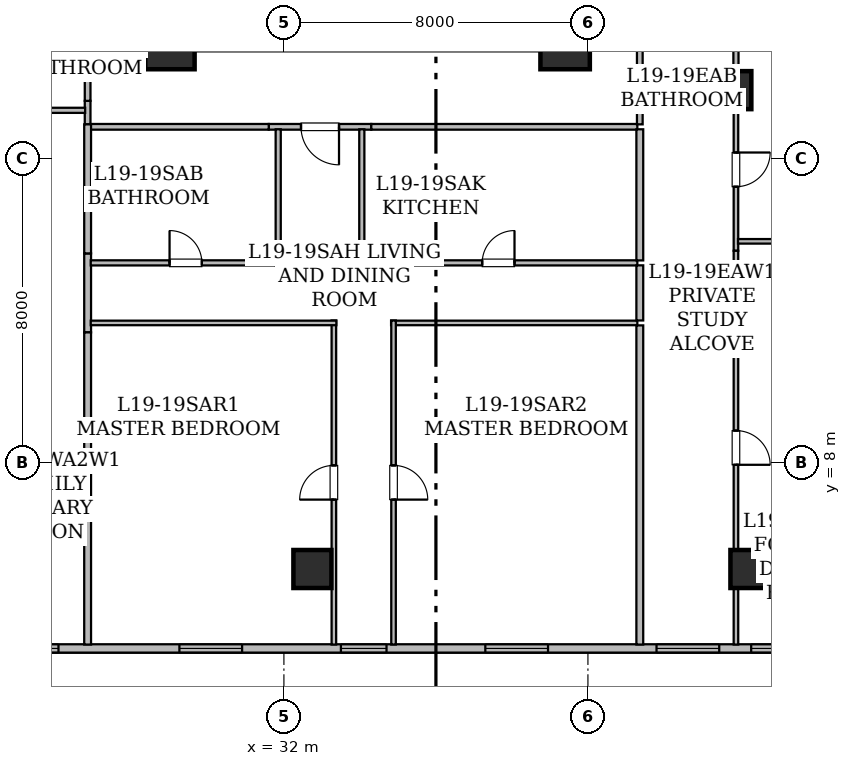
"""IFC4 building model, lengths in metres.
Left out: names, types, materials, properties, quantities, classifications, styles, units other than length and angle.
Written with IfcOpenShell. Run it as: python <this file> out.ifc"""

import sys

from ifc_helpers import new_model, si_unit, direction, frame, frame_2d, origin, origin_2d, place, context, subcontext, project, spatial, rectangle, hollow_rectangle, extrude, element, fill, save


model = new_model("IFC4")
c1 = context("Model", 3, precision=1e-05, world=origin(), true_north=direction((0.0, 1.0)))
c2 = subcontext(c1, "Body", "Model", "MODEL_VIEW")
j1 = project(units=[si_unit("LENGTHUNIT", "METRE"), si_unit("PLANEANGLEUNIT", "RADIAN")], contexts=[c1])
p1 = place(None, origin())
s1 = spatial("IfcSite", under=j1, at=p1, CompositionType="ELEMENT")
p2 = place(p1, origin())
s2 = spatial("IfcBuilding", under=s1, at=p2, CompositionType="ELEMENT")
p3 = place(p2, frame((0.0, 0.0, 77.1)))
s3 = spatial("IfcBuildingStorey", under=s2, at=p3, CompositionType="ELEMENT", Elevation=77.1)
for number, where, z_axis, x_axis in (
    (1, (29.0, 19.0, 0.0), (0.0, 0.0, 1.0), (1.0, 0.0, 0.0)),
    (2, (39.4, 19.0, 0.0), (0.0, 0.0, 1.0), (1.0, 0.0, 0.0)),
):
    element("IfcColumn", number, at=place(p3, frame(where, z_axis=z_axis, x_axis=x_axis)), inside=s3, PredefinedType="COLUMN", context=c2, shape_type="SweptSolid", body=[
        extrude(hollow_rectangle(XDim=1.3, YDim=1.3, WallThickness=0.065, at=origin_2d()), origin(), (0.0, 0.0, 1.0), 3.65),
    ])
for number, where, z_axis, x_axis in (
    (3, (32.75, 5.2, 0.0), (0.0, 0.0, 1.0), (1.0, 0.0, 0.0)),
    (4, (44.25, 5.2, 0.0), (0.0, 0.0, 1.0), (1.0, 0.0, 0.0)),
    (5, (43.8, 17.8, 0.0), (0.0, 0.0, 1.0), (1.0, 0.0, 0.0)),
):
    element("IfcColumn", number, at=place(p3, frame(where, z_axis=z_axis, x_axis=x_axis)), inside=s3, PredefinedType="COLUMN", context=c2, shape_type="SweptSolid", body=[
        extrude(hollow_rectangle(XDim=1.0, YDim=1.0, WallThickness=0.05, at=origin_2d()), origin(), (0.0, 0.0, 1.0), 3.65),
    ])
p4 = place(p3, frame((45.683, 3.11, 0.0), z_axis=(0.0, 0.0, 1.0), x_axis=(-1.0, 0.0, 0.0)))
e6 = element("IfcWall", 6, at=p4, inside=s3, PredefinedType="STANDARD", context=c2, shape_type="SweptSolid", body=[
    extrude(rectangle(XDim=37.368, YDim=0.22, at=frame_2d((18.684, 0.0))), origin(), (0.0, 0.0, 1.0), 3.43),
])
p5 = place(p4, frame((31.194, 0.0, 0.85)))
e7 = element("IfcOpeningElement", 7, at=p5, cuts=e6, PredefinedType="OPENING", context=c2, shape_type="SweptSolid", body=[
    extrude(rectangle(XDim=1.65, YDim=1.55, at=frame_2d((0.825, 0.775))), frame((0.0, 0.12, 0.0), z_axis=(0.0, -1.0, 0.0), x_axis=(1.0, 0.0, 0.0)), (0.0, 0.0, 1.0), 0.24),
])
p6 = place(p4, frame((19.615, 0.0, 0.85)))
e8 = element("IfcOpeningElement", 8, at=p6, cuts=e6, PredefinedType="OPENING", context=c2, shape_type="SweptSolid", body=[
    extrude(rectangle(XDim=1.65, YDim=1.55, at=frame_2d((0.825, 0.775))), frame((0.0, 0.12, 0.0), z_axis=(0.0, -1.0, 0.0), x_axis=(1.0, 0.0, 0.0)), (0.0, 0.0, 1.0), 0.24),
])
p7 = place(p4, frame((22.223, 0.0, 0.8)))
e9 = element("IfcOpeningElement", 9, at=p7, cuts=e6, PredefinedType="OPENING", context=c2, shape_type="SweptSolid", body=[
    extrude(rectangle(XDim=1.2, YDim=1.5, at=frame_2d((0.6, 0.75))), frame((0.0, 0.12, 0.0), z_axis=(0.0, -1.0, 0.0), x_axis=(1.0, 0.0, 0.0)), (0.0, 0.0, 1.0), 0.24),
])
p8 = place(p4, frame((25.65, 0.0, 0.85)))
e10 = element("IfcOpeningElement", 10, at=p8, cuts=e6, PredefinedType="OPENING", context=c2, shape_type="SweptSolid", body=[
    extrude(rectangle(XDim=1.65, YDim=1.55, at=frame_2d((0.825, 0.775))), frame((0.0, 0.12, 0.0), z_axis=(0.0, -1.0, 0.0), x_axis=(1.0, 0.0, 0.0)), (0.0, 0.0, 1.0), 0.24),
])
p9 = place(p4, frame((10.983, 0.0, 0.8)))
e11 = element("IfcOpeningElement", 11, at=p9, cuts=e6, PredefinedType="OPENING", context=c2, shape_type="SweptSolid", body=[
    extrude(rectangle(XDim=1.2, YDim=1.5, at=frame_2d((0.6, 0.75))), frame((0.0, 0.12, 0.0), z_axis=(0.0, -1.0, 0.0), x_axis=(1.0, 0.0, 0.0)), (0.0, 0.0, 1.0), 0.24),
])
p10 = place(p4, frame((14.783, 0.0, 0.85)))
e12 = element("IfcOpeningElement", 12, at=p10, cuts=e6, PredefinedType="OPENING", context=c2, shape_type="SweptSolid", body=[
    extrude(rectangle(XDim=1.65, YDim=1.55, at=frame_2d((0.825, 0.775))), frame((0.0, 0.12, 0.0), z_axis=(0.0, -1.0, 0.0), x_axis=(1.0, 0.0, 0.0)), (0.0, 0.0, 1.0), 0.24),
])
p11 = place(p4, frame((6.733, 0.0, 0.85)))
e13 = element("IfcOpeningElement", 13, at=p11, cuts=e6, PredefinedType="OPENING", context=c2, shape_type="SweptSolid", body=[
    extrude(rectangle(XDim=1.65, YDim=1.55, at=frame_2d((0.825, 0.775))), frame((0.0, 0.12, 0.0), z_axis=(0.0, -1.0, 0.0), x_axis=(1.0, 0.0, 0.0)), (0.0, 0.0, 1.0), 0.24),
])
p12 = place(p4, frame((2.228, 0.0, 0.85)))
e14 = element("IfcOpeningElement", 14, at=p12, cuts=e6, PredefinedType="OPENING", context=c2, shape_type="SweptSolid", body=[
    extrude(rectangle(XDim=1.65, YDim=1.55, at=frame_2d((0.825, 0.775))), frame((0.0, 0.12, 0.0), z_axis=(0.0, -1.0, 0.0), x_axis=(1.0, 0.0, 0.0)), (0.0, 0.0, 1.0), 0.24),
])
p13 = place(p4, frame((0.187, 0.0, 0.8)))
e15 = element("IfcOpeningElement", 15, at=p13, cuts=e6, PredefinedType="OPENING", context=c2, shape_type="SweptSolid", body=[
    extrude(rectangle(XDim=1.2, YDim=1.5, at=frame_2d((0.6, 0.75))), frame((0.0, 0.12, 0.0), z_axis=(0.0, -1.0, 0.0), x_axis=(1.0, 0.0, 0.0)), (0.0, 0.0, 1.0), 0.24),
])
p14 = place(p3, frame((26.835, 16.9, 0.0), z_axis=(0.0, 0.0, 1.0), x_axis=(0.0, 1.0, 0.0)))
e16 = element("IfcWall", 16, at=p14, inside=s3, PredefinedType="STANDARD", context=c2, shape_type="SweptSolid", body=[
    extrude(rectangle(XDim=0.618, YDim=0.15, at=frame_2d((0.309, 0.0))), origin(), (0.0, 0.0, 1.0), 3.43),
])
p15 = place(p3, frame((26.835, 17.518, 0.0), z_axis=(0.0, 0.0, 1.0), x_axis=(0.0, 1.0, 0.0)))
e17 = element("IfcWall", 17, at=p15, inside=s3, PredefinedType="STANDARD", context=c2, shape_type="SweptSolid", body=[
    extrude(rectangle(XDim=3.467, YDim=0.15, at=frame_2d((1.733, 0.0))), origin(), (0.0, 0.0, 1.0), 2.647),
])
p16 = place(p3, frame((34.299, 16.835, 0.0), z_axis=(0.0, 0.0, 1.0), x_axis=(-1.0, 0.0, 0.0)))
e18 = element("IfcWall", 18, at=p16, inside=s3, PredefinedType="STANDARD", context=c2, shape_type="SweptSolid", body=[
    extrude(rectangle(XDim=2.698, YDim=0.15, at=frame_2d((1.349, 0.0))), origin(), (0.0, 0.0, 1.0), 3.43),
])
p17 = place(p16, frame((0.849, 0.0, 0.0)))
e19 = element("IfcOpeningElement", 19, at=p17, cuts=e18, PredefinedType="OPENING", context=c2, shape_type="SweptSolid", body=[
    extrude(rectangle(XDim=1.0, YDim=2.15, at=frame_2d((0.5, 1.075))), frame((0.0, 0.085, 0.0), z_axis=(0.0, -1.0, 0.0), x_axis=(1.0, 0.0, 0.0)), (0.0, 0.0, 1.0), 0.17),
])
p18 = place(p3, frame((31.601, 16.835, 0.0), z_axis=(0.0, 0.0, 1.0), x_axis=(-1.0, 0.0, 0.0)))
e20 = element("IfcWall", 20, at=p18, inside=s3, PredefinedType="STANDARD", context=c2, shape_type="SweptSolid", body=[
    extrude(rectangle(XDim=4.701, YDim=0.15, at=frame_2d((2.351, 0.0))), origin(), (0.0, 0.0, 1.0), 2.647),
])
p19 = place(p3, frame((41.3, 16.835, 0.0), z_axis=(0.0, 0.0, 1.0), x_axis=(-1.0, 0.0, 0.0)))
e21 = element("IfcWall", 21, at=p19, inside=s3, PredefinedType="STANDARD", context=c2, shape_type="SweptSolid", body=[
    extrude(rectangle(XDim=7.001, YDim=0.15, at=frame_2d((3.5, 0.0))), origin(), (0.0, 0.0, 1.0), 3.43),
])
p20 = place(p3, frame((41.365, 18.118, 0.0), z_axis=(0.0, 0.0, 1.0), x_axis=(0.0, -1.0, 0.0)))
e22 = element("IfcWall", 22, at=p20, inside=s3, PredefinedType="STANDARD", context=c2, shape_type="SweptSolid", body=[
    extrude(rectangle(XDim=1.218, YDim=0.15, at=frame_2d((0.609, 0.0))), origin(), (0.0, 0.0, 1.0), 3.43),
])
p21 = place(p3, frame((41.365, 21.585, 0.0), z_axis=(0.0, 0.0, 1.0), x_axis=(0.0, -1.0, 0.0)))
e23 = element("IfcWall", 23, at=p21, inside=s3, PredefinedType="STANDARD", context=c2, shape_type="SweptSolid", body=[
    extrude(rectangle(XDim=3.467, YDim=0.15, at=frame_2d((1.733, 0.0))), origin(), (0.0, 0.0, 1.0), 2.647),
])
p22 = place(p3, frame((23.715, 17.269, 0.0), z_axis=(0.0, 0.0, 1.0), x_axis=(1.0, 0.0, 0.0)))
e24 = element("IfcWall", 24, at=p22, inside=s3, PredefinedType="PARTITIONING", context=c2, shape_type="SweptSolid", body=[
    extrude(rectangle(XDim=3.055, YDim=0.135, at=frame_2d((1.527, 0.0))), origin(), (0.0, 0.0, 1.0), 3.43),
])
p23 = place(p3, frame((26.835, 13.504, 0.0), z_axis=(0.0, 0.0, 1.0), x_axis=(0.0, -1.0, 0.0)))
e25 = element("IfcWall", 25, at=p23, inside=s3, PredefinedType="STANDARD", context=c2, shape_type="SweptSolid", body=[
    extrude(rectangle(XDim=2.078, YDim=0.18, at=frame_2d((1.039, 0.0))), origin(), (0.0, 0.0, 1.0), 3.43),
])
p24 = place(p3, frame((26.835, 16.9, 0.0), z_axis=(0.0, 0.0, 1.0), x_axis=(0.0, -1.0, 0.0)))
e26 = element("IfcWall", 26, at=p24, inside=s3, PredefinedType="STANDARD", context=c2, shape_type="SweptSolid", body=[
    extrude(rectangle(XDim=3.396, YDim=0.18, at=frame_2d((1.698, 0.0))), origin(), (0.0, 0.0, 1.0), 3.43),
])
p25 = place(p3, frame((26.835, 11.426, 0.0), z_axis=(0.0, 0.0, 1.0), x_axis=(0.0, -1.0, 0.0)))
e27 = element("IfcWall", 27, at=p25, inside=s3, PredefinedType="STANDARD", context=c2, shape_type="SweptSolid", body=[
    extrude(rectangle(XDim=8.214, YDim=0.18, at=frame_2d((4.107, 0.0))), origin(), (0.0, 0.0, 1.0), 2.803),
])
p26 = place(p3, frame((26.917, 13.255, 0.0), z_axis=(0.0, 0.0, 1.0), x_axis=(1.0, 0.0, 0.0)))
e28 = element("IfcWall", 28, at=p26, inside=s3, PredefinedType="PARTITIONING", context=c2, shape_type="SweptSolid", body=[
    extrude(rectangle(XDim=4.998, YDim=0.135, at=frame_2d((2.499, 0.0))), origin(), (0.0, 0.0, 1.0), 2.647),
])
p27 = place(p26, frame((2.074, 0.0, 0.0)))
e29 = element("IfcOpeningElement", 29, at=p27, cuts=e28, PredefinedType="OPENING", context=c2, shape_type="SweptSolid", body=[
    extrude(rectangle(XDim=0.85, YDim=2.1, at=frame_2d((0.425, 1.05))), frame((0.0, 0.077, 0.0), z_axis=(0.0, -1.0, 0.0), x_axis=(1.0, 0.0, 0.0)), (0.0, 0.0, 1.0), 0.155),
])
for number, where, z_axis, x_axis in (
    (30, (31.85, 13.19, 0.0), (0.0, 0.0, 1.0), (0.0, 1.0, 0.0)),
    (31, (34.05, 16.77, 0.0), (0.0, 0.0, 1.0), (0.0, -1.0, 0.0)),
):
    element("IfcWall", number, at=place(p3, frame(where, z_axis=z_axis, x_axis=x_axis)), inside=s3, PredefinedType="PARTITIONING", context=c2, shape_type="SweptSolid", body=[
        extrude(rectangle(XDim=3.58, YDim=0.135, at=frame_2d((1.79, 0.0))), origin(), (0.0, 0.0, 1.0), 3.43),
    ])
p28 = place(p3, frame((33.985, 13.255, 0.0), z_axis=(0.0, 0.0, 1.0), x_axis=(1.0, 0.0, 0.0)))
e32 = element("IfcWall", 32, at=p28, inside=s3, PredefinedType="PARTITIONING", context=c2, shape_type="SweptSolid", body=[
    extrude(rectangle(XDim=7.315, YDim=0.135, at=frame_2d((3.657, 0.0))), origin(), (0.0, 0.0, 1.0), 3.43),
])
p29 = place(p28, frame((3.233, 0.0, 0.0)))
e33 = element("IfcOpeningElement", 33, at=p29, cuts=e32, PredefinedType="OPENING", context=c2, shape_type="SweptSolid", body=[
    extrude(rectangle(XDim=0.85, YDim=2.1, at=frame_2d((0.425, 1.05))), frame((0.0, 0.077, 0.0), z_axis=(0.0, -1.0, 0.0), x_axis=(1.0, 0.0, 0.0)), (0.0, 0.0, 1.0), 0.155),
])
p30 = place(p3, frame((33.315, 3.212, 0.0), z_axis=(0.0, 0.0, 1.0), x_axis=(0.0, 1.0, 0.0)))
e34 = element("IfcWall", 34, at=p30, inside=s3, PredefinedType="PARTITIONING", context=c2, shape_type="SweptSolid", body=[
    extrude(rectangle(XDim=8.528, YDim=0.12, at=frame_2d((4.264, 0.0))), origin(), (0.0, 0.0, 1.0), 2.803),
])
p31 = place(p30, frame((3.814, 0.0, 0.0)))
e35 = element("IfcOpeningElement", 35, at=p31, cuts=e34, PredefinedType="OPENING", context=c2, shape_type="SweptSolid", body=[
    extrude(rectangle(XDim=0.9, YDim=2.1, at=frame_2d((0.45, 1.05))), frame((0.0, 0.07, 0.0), z_axis=(0.0, -1.0, 0.0), x_axis=(1.0, 0.0, 0.0)), (0.0, 0.0, 1.0), 0.14),
])
p32 = place(p3, frame((33.38, 11.675, 0.0), z_axis=(0.0, 0.0, 1.0), x_axis=(-1.0, 0.0, 0.0)))
e36 = element("IfcWall", 36, at=p32, inside=s3, PredefinedType="PARTITIONING", context=c2, shape_type="SweptSolid", body=[
    extrude(rectangle(XDim=6.463, YDim=0.12, at=frame_2d((3.231, 0.0))), origin(), (0.0, 0.0, 1.0), 2.647),
])
p33 = place(p3, frame((41.3, 11.675, 0.0), z_axis=(0.0, 0.0, 1.0), x_axis=(-1.0, 0.0, 0.0)))
e37 = element("IfcWall", 37, at=p33, inside=s3, PredefinedType="PARTITIONING", context=c2, shape_type="SweptSolid", body=[
    extrude(rectangle(XDim=6.48, YDim=0.12, at=frame_2d((3.24, 0.0))), origin(), (0.0, 0.0, 1.0), 3.43),
])
p34 = place(p3, frame((34.885, 11.74, 0.0), z_axis=(0.0, 0.0, 1.0), x_axis=(0.0, -1.0, 0.0)))
e38 = element("IfcWall", 38, at=p34, inside=s3, PredefinedType="PARTITIONING", context=c2, shape_type="SweptSolid", body=[
    extrude(rectangle(XDim=8.528, YDim=0.12, at=frame_2d((4.264, 0.0))), origin(), (0.0, 0.0, 1.0), 2.803),
])
p35 = place(p34, frame((3.814, 0.0, 0.0)))
e39 = element("IfcOpeningElement", 39, at=p35, cuts=e38, PredefinedType="OPENING", context=c2, shape_type="SweptSolid", body=[
    extrude(rectangle(XDim=0.9, YDim=2.1, at=frame_2d((0.45, 1.05))), frame((0.0, 0.07, 0.0), z_axis=(0.0, -1.0, 0.0), x_axis=(1.0, 0.0, 0.0)), (0.0, 0.0, 1.0), 0.14),
])
p36 = place(p3, frame((41.365, 13.19, 0.0), z_axis=(0.0, 0.0, 1.0), x_axis=(0.0, -1.0, 0.0)))
e40 = element("IfcWall", 40, at=p36, inside=s3, PredefinedType="STANDARD", context=c2, shape_type="SweptSolid", body=[
    extrude(rectangle(XDim=1.45, YDim=0.18, at=frame_2d((0.725, 0.0))), origin(), (0.0, 0.0, 1.0), 3.43),
])
p37 = place(p3, frame((41.365, 16.77, 0.0), z_axis=(0.0, 0.0, 1.0), x_axis=(0.0, -1.0, 0.0)))
e41 = element("IfcWall", 41, at=p37, inside=s3, PredefinedType="STANDARD", context=c2, shape_type="SweptSolid", body=[
    extrude(rectangle(XDim=3.45, YDim=0.18, at=frame_2d((1.725, 0.0))), origin(), (0.0, 0.0, 1.0), 3.43),
])
p38 = place(p3, frame((41.365, 11.61, 0.0), z_axis=(0.0, 0.0, 1.0), x_axis=(0.0, -1.0, 0.0)))
e42 = element("IfcWall", 42, at=p38, inside=s3, PredefinedType="STANDARD", context=c2, shape_type="SweptSolid", body=[
    extrude(rectangle(XDim=8.398, YDim=0.18, at=frame_2d((4.199, 0.0))), origin(), (0.0, 0.0, 1.0), 2.803),
])
p39 = place(p3, frame((43.895, 17.804, 0.0), z_axis=(0.0, 0.0, 1.0), x_axis=(0.0, -1.0, 0.0)))
e43 = element("IfcWall", 43, at=p39, inside=s3, PredefinedType="PARTITIONING", context=c2, shape_type="SweptSolid", body=[
    extrude(rectangle(XDim=4.231, YDim=0.12, at=frame_2d((2.115, 0.0))), origin(), (0.0, 0.0, 1.0), 2.647),
])
p40 = place(p39, frame((1.645, 0.0, 0.0)))
e44 = element("IfcOpeningElement", 44, at=p40, cuts=e43, PredefinedType="OPENING", context=c2, shape_type="SweptSolid", body=[
    extrude(rectangle(XDim=0.9, YDim=2.1, at=frame_2d((0.45, 1.05))), frame((0.0, 0.07, 0.0), z_axis=(0.0, -1.0, 0.0), x_axis=(1.0, 0.0, 0.0)), (0.0, 0.0, 1.0), 0.14),
])
p41 = place(p3, frame((43.895, 13.573, 0.0), z_axis=(0.0, 0.0, 1.0), x_axis=(0.0, -1.0, 0.0)))
e45 = element("IfcWall", 45, at=p41, inside=s3, PredefinedType="PARTITIONING", context=c2, shape_type="SweptSolid", body=[
    extrude(rectangle(XDim=10.361, YDim=0.12, at=frame_2d((5.181, 0.0))), origin(), (0.0, 0.0, 1.0), 2.647),
])
p42 = place(p41, frame((4.731, 0.0, 0.0)))
e46 = element("IfcOpeningElement", 46, at=p42, cuts=e45, PredefinedType="OPENING", context=c2, shape_type="SweptSolid", body=[
    extrude(rectangle(XDim=0.9, YDim=2.1, at=frame_2d((0.45, 1.05))), frame((0.0, 0.07, 0.0), z_axis=(0.0, -1.0, 0.0), x_axis=(1.0, 0.0, 0.0)), (0.0, 0.0, 1.0), 0.14),
])
p43 = place(p3, frame((41.432, 17.869, 0.0), z_axis=(0.0, 0.0, 1.0), x_axis=(1.0, 0.0, 0.0)))
e47 = element("IfcWall", 47, at=p43, inside=s3, PredefinedType="PARTITIONING", context=c2, shape_type="SweptSolid", body=[
    extrude(rectangle(XDim=2.398, YDim=0.135, at=frame_2d((1.199, 0.0))), origin(), (0.0, 0.0, 1.0), 2.647),
])
p44 = place(p3, frame((47.31, 13.822, 0.0), z_axis=(0.0, 0.0, 1.0), x_axis=(-1.0, 0.0, 0.0)))
e48 = element("IfcWall", 48, at=p44, inside=s3, PredefinedType="PARTITIONING", context=c2, shape_type="SweptSolid", body=[
    extrude(rectangle(XDim=3.361, YDim=0.12, at=frame_2d((1.681, 0.0))), origin(), (0.0, 0.0, 1.0), 2.647),
])
p45 = place(p44, frame((1.231, 0.0, 0.0)))
e49 = element("IfcOpeningElement", 49, at=p45, cuts=e48, PredefinedType="OPENING", context=c2, shape_type="SweptSolid", body=[
    extrude(rectangle(XDim=0.9, YDim=2.1, at=frame_2d((0.45, 1.05))), frame((0.0, 0.07, 0.0), z_axis=(0.0, -1.0, 0.0), x_axis=(1.0, 0.0, 0.0)), (0.0, 0.0, 1.0), 0.14),
])
p46 = place(p3, frame((43.895, 17.804, 0.0), z_axis=(0.0, 0.0, 1.0), x_axis=(0.0, 1.0, 0.0)))
e50 = element("IfcWall", 50, at=p46, inside=s3, PredefinedType="PARTITIONING", context=c2, shape_type="SweptSolid", body=[
    extrude(rectangle(XDim=4.095, YDim=0.135, at=frame_2d((2.047, 0.0))), origin(), (0.0, 0.0, 1.0), 2.647),
])
p47 = place(p46, frame((1.622, 0.0, 0.0)))
e51 = element("IfcOpeningElement", 51, at=p47, cuts=e50, PredefinedType="OPENING", context=c2, shape_type="SweptSolid", body=[
    extrude(rectangle(XDim=0.85, YDim=2.1, at=frame_2d((0.425, 1.05))), frame((0.0, 0.077, 0.0), z_axis=(0.0, -1.0, 0.0), x_axis=(1.0, 0.0, 0.0)), (0.0, 0.0, 1.0), 0.155),
])
p48 = place(p6, origin())
e52 = element("IfcWindow", 52, at=p48, inside=s3, PartitioningType="SINGLE_PANEL", PredefinedType="WINDOW", context=c2, shape_type="SweptSolid", body=[
    extrude(rectangle(XDim=1.65, YDim=1.55, at=frame_2d((0.825, 0.775))), frame((0.0, 0.03, 0.0), z_axis=(0.0, -1.0, 0.0), x_axis=(1.0, 0.0, 0.0)), (0.0, 0.0, 1.0), 0.06),
])
fill(e8, e52)
p49 = place(p9, origin())
e53 = element("IfcWindow", 53, at=p49, inside=s3, PartitioningType="SINGLE_PANEL", PredefinedType="WINDOW", context=c2, shape_type="SweptSolid", body=[
    extrude(rectangle(XDim=1.2, YDim=1.5, at=frame_2d((0.6, 0.75))), frame((0.0, 0.03, 0.0), z_axis=(0.0, -1.0, 0.0), x_axis=(1.0, 0.0, 0.0)), (0.0, 0.0, 1.0), 0.06),
])
fill(e11, e53)
p50 = place(p10, origin())
e54 = element("IfcWindow", 54, at=p50, inside=s3, PartitioningType="SINGLE_PANEL", PredefinedType="WINDOW", context=c2, shape_type="SweptSolid", body=[
    extrude(rectangle(XDim=1.65, YDim=1.55, at=frame_2d((0.825, 0.775))), frame((0.0, 0.03, 0.0), z_axis=(0.0, -1.0, 0.0), x_axis=(1.0, 0.0, 0.0)), (0.0, 0.0, 1.0), 0.06),
])
fill(e12, e54)
p51 = place(p11, origin())
e55 = element("IfcWindow", 55, at=p51, inside=s3, PartitioningType="SINGLE_PANEL", PredefinedType="WINDOW", context=c2, shape_type="SweptSolid", body=[
    extrude(rectangle(XDim=1.65, YDim=1.55, at=frame_2d((0.825, 0.775))), frame((0.0, 0.03, 0.0), z_axis=(0.0, -1.0, 0.0), x_axis=(1.0, 0.0, 0.0)), (0.0, 0.0, 1.0), 0.06),
])
fill(e13, e55)
p52 = place(p12, origin())
e56 = element("IfcWindow", 56, at=p52, inside=s3, PartitioningType="SINGLE_PANEL", PredefinedType="WINDOW", context=c2, shape_type="SweptSolid", body=[
    extrude(rectangle(XDim=1.65, YDim=1.55, at=frame_2d((0.825, 0.775))), frame((0.0, 0.03, 0.0), z_axis=(0.0, -1.0, 0.0), x_axis=(1.0, 0.0, 0.0)), (0.0, 0.0, 1.0), 0.06),
])
fill(e14, e56)
p53 = place(p13, origin())
e57 = element("IfcWindow", 57, at=p53, inside=s3, PartitioningType="SINGLE_PANEL", PredefinedType="WINDOW", context=c2, shape_type="SweptSolid", body=[
    extrude(rectangle(XDim=1.2, YDim=1.5, at=frame_2d((0.6, 0.75))), frame((0.0, 0.03, 0.0), z_axis=(0.0, -1.0, 0.0), x_axis=(1.0, 0.0, 0.0)), (0.0, 0.0, 1.0), 0.06),
])
fill(e15, e57)
p54 = place(p17, origin())
e58 = element("IfcDoor", 58, at=p54, inside=s3, OperationType="SINGLE_SWING_LEFT", PredefinedType="DOOR", context=c2, shape_type="SweptSolid", body=[
    extrude(rectangle(XDim=1.0, YDim=2.15, at=frame_2d((0.5, 1.075))), frame((0.0, 0.025, 0.0), z_axis=(0.0, -1.0, 0.0), x_axis=(1.0, 0.0, 0.0)), (0.0, 0.0, 1.0), 0.05),
])
fill(e19, e58)
p55 = place(p27, origin())
e59 = element("IfcDoor", 59, at=p55, inside=s3, OperationType="SINGLE_SWING_LEFT", PredefinedType="DOOR", context=c2, shape_type="SweptSolid", body=[
    extrude(rectangle(XDim=0.85, YDim=2.1, at=frame_2d((0.425, 1.05))), frame((0.0, 0.025, 0.0), z_axis=(0.0, -1.0, 0.0), x_axis=(1.0, 0.0, 0.0)), (0.0, 0.0, 1.0), 0.05),
])
fill(e29, e59)
p56 = place(p29, origin())
e60 = element("IfcDoor", 60, at=p56, inside=s3, OperationType="SINGLE_SWING_RIGHT", PredefinedType="DOOR", context=c2, shape_type="SweptSolid", body=[
    extrude(rectangle(XDim=0.85, YDim=2.1, at=frame_2d((0.425, 1.05))), frame((0.0, 0.025, 0.0), z_axis=(0.0, -1.0, 0.0), x_axis=(1.0, 0.0, 0.0)), (0.0, 0.0, 1.0), 0.05),
])
fill(e33, e60)
p57 = place(p31, origin())
e61 = element("IfcDoor", 61, at=p57, inside=s3, OperationType="SINGLE_SWING_LEFT", PredefinedType="DOOR", context=c2, shape_type="SweptSolid", body=[
    extrude(rectangle(XDim=0.9, YDim=2.1, at=frame_2d((0.45, 1.05))), frame((0.0, 0.025, 0.0), z_axis=(0.0, -1.0, 0.0), x_axis=(1.0, 0.0, 0.0)), (0.0, 0.0, 1.0), 0.05),
])
fill(e35, e61)
p58 = place(p35, origin())
e62 = element("IfcDoor", 62, at=p58, inside=s3, OperationType="SINGLE_SWING_RIGHT", PredefinedType="DOOR", context=c2, shape_type="SweptSolid", body=[
    extrude(rectangle(XDim=0.9, YDim=2.1, at=frame_2d((0.45, 1.05))), frame((0.0, 0.025, 0.0), z_axis=(0.0, -1.0, 0.0), x_axis=(1.0, 0.0, 0.0)), (0.0, 0.0, 1.0), 0.05),
])
fill(e39, e62)
p59 = place(p40, origin())
e63 = element("IfcDoor", 63, at=p59, inside=s3, OperationType="SINGLE_SWING_LEFT", PredefinedType="DOOR", context=c2, shape_type="SweptSolid", body=[
    extrude(rectangle(XDim=0.9, YDim=2.1, at=frame_2d((0.45, 1.05))), frame((0.0, 0.025, 0.0), z_axis=(0.0, -1.0, 0.0), x_axis=(1.0, 0.0, 0.0)), (0.0, 0.0, 1.0), 0.05),
])
fill(e44, e63)
p60 = place(p42, origin())
e64 = element("IfcDoor", 64, at=p60, inside=s3, OperationType="SINGLE_SWING_RIGHT", PredefinedType="DOOR", context=c2, shape_type="SweptSolid", body=[
    extrude(rectangle(XDim=0.9, YDim=2.1, at=frame_2d((0.45, 1.05))), frame((0.0, 0.025, 0.0), z_axis=(0.0, -1.0, 0.0), x_axis=(1.0, 0.0, 0.0)), (0.0, 0.0, 1.0), 0.05),
])
fill(e46, e64)
save(model, sys.argv[1])
